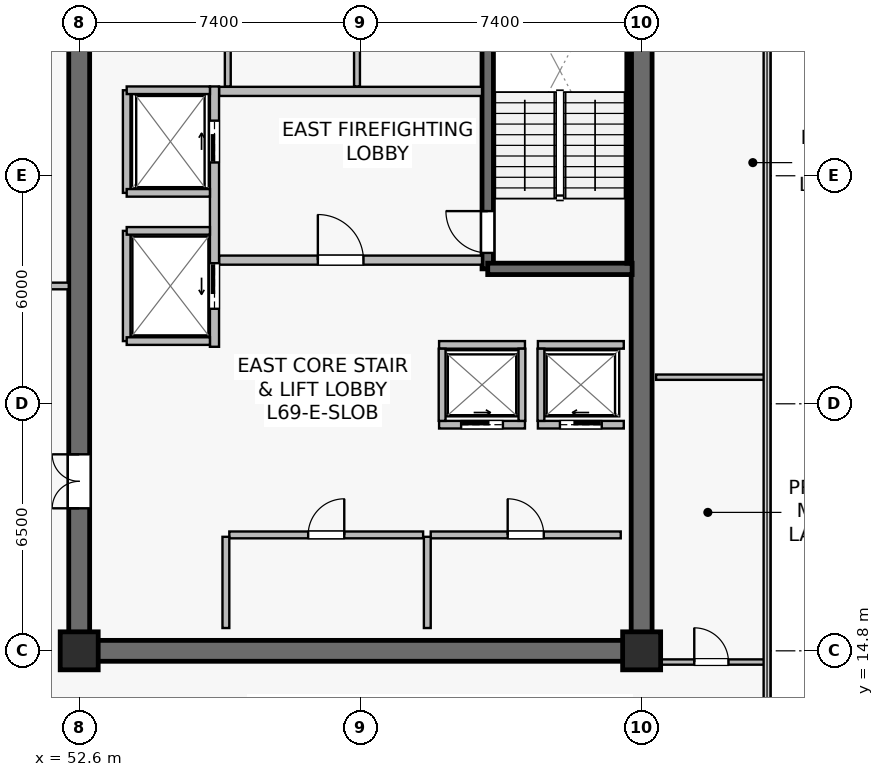
"""IFC4 building model, lengths in metres.
Left out: names, types, materials, properties, quantities, classifications, styles, units other than length and angle.
Written with IfcOpenShell. Run it as: python <this file> out.ifc"""

import sys

from ifc_helpers import new_model, si_unit, direction, frame, frame_2d, origin, origin_2d, place, context, subcontext, project, spatial, rectangle, extrude, source, transform, mapped, element, fill, save


model = new_model("IFC4")
c1 = context("Model", 3, precision=1e-05, world=origin(), true_north=direction((0.0, 1.0)))
c2 = subcontext(c1, "Body", "Model", "MODEL_VIEW")
j1 = project(units=[si_unit("LENGTHUNIT", "METRE"), si_unit("PLANEANGLEUNIT", "RADIAN")], contexts=[c1])
p1 = place(None, origin())
s1 = spatial("IfcSite", under=j1, at=p1, CompositionType="ELEMENT")
p2 = place(p1, origin())
s2 = spatial("IfcBuilding", under=s1, at=p2, CompositionType="ELEMENT")
p3 = place(p2, frame((0.0, 0.0, 287.5)))
s3 = spatial("IfcBuildingStorey", under=s2, at=p3, CompositionType="ELEMENT", Elevation=287.5)
p4 = place(p3, frame((52.325, 14.8, 0.0), z_axis=(0.0, 0.0, 1.0), x_axis=(1.0, 0.0, 0.0)))
e1 = element("IfcWall", 1, at=p4, inside=s3, PredefinedType="SHEAR", context=c2, shape_type="SweptSolid", body=[
    extrude(rectangle(XDim=15.35, YDim=0.55, at=frame_2d((7.675, 0.0))), origin(), (0.0, 0.0, 1.0), 3.8),
])
p5 = place(p3, frame((52.6, 15.075, 0.0), z_axis=(0.0, 0.0, 1.0), x_axis=(0.0, 1.0, 0.0)))
e2 = element("IfcWall", 2, at=p5, inside=s3, PredefinedType="SHEAR", context=c2, shape_type="SweptSolid", body=[
    extrude(rectangle(XDim=18.45, YDim=0.55, at=frame_2d((9.225, 0.0))), origin(), (0.0, 0.0, 1.0), 3.8),
])
p6 = place(p5, frame((3.475, 0.0, 0.0)))
e3 = element("IfcOpeningElement", 3, at=p6, cuts=e2, PredefinedType="OPENING", context=c2, shape_type="SweptSolid", body=[
    extrude(rectangle(XDim=1.42, YDim=2.2, at=frame_2d((0.71, 1.1))), frame((0.0, 0.285, 0.0), z_axis=(0.0, -1.0, 0.0), x_axis=(1.0, 0.0, 0.0)), (0.0, 0.0, 1.0), 0.57),
])
p7 = place(p3, frame((67.4, 15.075, 0.0), z_axis=(0.0, 0.0, 1.0), x_axis=(0.0, 1.0, 0.0)))
e4 = element("IfcWall", 4, at=p7, inside=s3, PredefinedType="SHEAR", context=c2, shape_type="SweptSolid", body=[
    extrude(rectangle(XDim=18.45, YDim=0.55, at=frame_2d((9.225, 0.0))), origin(), (0.0, 0.0, 1.0), 3.8),
])
p8 = place(p3, frame((63.35, 24.85, 0.0), z_axis=(0.0, 0.0, 1.0), x_axis=(0.0, 1.0, 0.0)))
e5 = element("IfcWall", 5, at=p8, inside=s3, PredefinedType="SHEAR", context=c2, shape_type="SweptSolid", body=[
    extrude(rectangle(XDim=8.63, YDim=0.3, at=frame_2d((4.315, 0.0))), origin(), (0.0, 0.0, 1.0), 3.8),
])
p9 = place(p8, frame((0.42, 0.0, 0.0)))
e6 = element("IfcOpeningElement", 6, at=p9, cuts=e5, PredefinedType="OPENING", context=c2, shape_type="SweptSolid", body=[
    extrude(rectangle(XDim=1.1, YDim=2.15, at=frame_2d((0.55, 1.075))), frame((0.0, 0.16, 0.0), z_axis=(0.0, -1.0, 0.0), x_axis=(1.0, 0.0, 0.0)), (0.0, 0.0, 1.0), 0.32),
])
p10 = place(p3, frame((63.35, 24.85, 0.0), z_axis=(0.0, 0.0, 1.0), x_axis=(1.0, 0.0, 0.0)))
e7 = element("IfcWall", 7, at=p10, inside=s3, PredefinedType="SHEAR", context=c2, shape_type="SweptSolid", body=[
    extrude(rectangle(XDim=3.8, YDim=0.3, at=frame_2d((1.9, 0.0))), origin(), (0.0, 0.0, 1.0), 3.8),
])
p11 = place(p3, frame((67.07, 25.0, 0.0), z_axis=(0.0, 0.0, 1.0), x_axis=(0.0, 1.0, 0.0)))
e8 = element("IfcWall", 8, at=p11, inside=s3, PredefinedType="SOLIDWALL", context=c2, shape_type="SweptSolid", body=[
    extrude(rectangle(XDim=8.32, YDim=0.12, at=frame_2d((4.16, 0.0))), origin(), (0.0, 0.0, 1.0), 3.8),
])
m1 = source(origin(), c2, "Body", "SweptSolid", [
    extrude(rectangle(XDim=1.0, YDim=1.0, at=origin_2d()), origin(), (0.0, 0.0, 1.0), 4.1),
])
for number, where, z_axis, x_axis in (
    (9, (52.6, 14.8, 0.0), (0.0, 0.0, 1.0), (1.0, 0.0, 0.0)),
    (10, (67.4, 14.8, 0.0), (0.0, 0.0, 1.0), (1.0, 0.0, 0.0)),
):
    element("IfcColumn", number, at=place(p3, frame(where, z_axis=z_axis, x_axis=x_axis)), inside=s3, PredefinedType="COLUMN", context=c2, shape_type="MappedRepresentation", body=[
        mapped(m1, transform((0.0, 0.0, 0.0), scale=1.0)),
    ])
p12 = place(p3, frame((56.28, 25.08, 0.0), z_axis=(0.0, 0.0, 1.0), x_axis=(1.0, 0.0, 0.0)))
e11 = element("IfcWall", 11, at=p12, inside=s3, PredefinedType="SOLIDWALL", context=c2, shape_type="SweptSolid", body=[
    extrude(rectangle(XDim=6.92, YDim=0.24, at=frame_2d((3.46, 0.0))), origin(), (0.0, 0.0, 1.0), 3.197),
])
p13 = place(p12, frame((2.6, 0.0, 0.0)))
e12 = element("IfcOpeningElement", 12, at=p13, cuts=e11, PredefinedType="OPENING", context=c2, shape_type="SweptSolid", body=[
    extrude(rectangle(XDim=1.2, YDim=2.16, at=frame_2d((0.6, 1.08))), frame((0.0, 0.13, 0.0), z_axis=(0.0, -1.0, 0.0), x_axis=(1.0, 0.0, 0.0)), (0.0, 0.0, 1.0), 0.26),
])
p14 = place(p3, frame((56.28, 29.52, 0.0), z_axis=(0.0, 0.0, 1.0), x_axis=(1.0, 0.0, 0.0)))
e13 = element("IfcWall", 13, at=p14, inside=s3, PredefinedType="SOLIDWALL", context=c2, shape_type="SweptSolid", body=[
    extrude(rectangle(XDim=6.92, YDim=0.24, at=frame_2d((3.46, 0.0))), origin(), (0.0, 0.0, 1.0), 3.197),
])
p15 = place(p3, frame((56.16, 22.8, 0.0), z_axis=(0.0, 0.0, 1.0), x_axis=(0.0, 1.0, 0.0)))
e14 = element("IfcWall", 14, at=p15, inside=s3, PredefinedType="SOLIDWALL", context=c2, shape_type="SweptSolid", body=[
    extrude(rectangle(XDim=6.85, YDim=0.24, at=frame_2d((3.425, 0.0))), origin(), (0.0, 0.0, 1.0), 2.935),
])
p16 = place(p15, frame((4.85, 0.0, 0.0)))
e15 = element("IfcOpeningElement", 15, at=p16, cuts=e14, PredefinedType="OPENING", context=c2, shape_type="SweptSolid", body=[
    extrude(rectangle(XDim=1.1, YDim=2.22, at=frame_2d((0.55, 1.11))), frame((0.0, 0.13, 0.0), z_axis=(0.0, -1.0, 0.0), x_axis=(1.0, 0.0, 0.0)), (0.0, 0.0, 1.0), 0.26),
])
p17 = place(p15, frame((1.0, 0.0, 0.0)))
e16 = element("IfcOpeningElement", 16, at=p17, cuts=e14, PredefinedType="OPENING", context=c2, shape_type="SweptSolid", body=[
    extrude(rectangle(XDim=1.2, YDim=2.22, at=frame_2d((0.6, 1.11))), frame((0.0, 0.13, 0.0), z_axis=(0.0, -1.0, 0.0), x_axis=(1.0, 0.0, 0.0)), (0.0, 0.0, 1.0), 0.26),
])
p18 = place(p3, frame((64.67, 20.75, 0.0), z_axis=(0.0, 0.0, 1.0), x_axis=(1.0, 0.0, 0.0)))
e17 = element("IfcWall", 17, at=p18, inside=s3, PredefinedType="SOLIDWALL", context=c2, shape_type="SweptSolid", body=[
    extrude(rectangle(XDim=2.26, YDim=0.2, at=frame_2d((1.13, 0.0))), origin(), (0.0, 0.0, 1.0), 3.8),
])
p19 = place(p18, frame((0.58, 0.0, 0.0)))
e18 = element("IfcOpeningElement", 18, at=p19, cuts=e17, PredefinedType="OPENING", context=c2, shape_type="SweptSolid", body=[
    extrude(rectangle(XDim=1.1, YDim=2.22, at=frame_2d((0.55, 1.11))), frame((0.0, 0.11, 0.0), z_axis=(0.0, -1.0, 0.0), x_axis=(1.0, 0.0, 0.0)), (0.0, 0.0, 1.0), 0.22),
])
p20 = place(p3, frame((64.67, 22.85, 0.0), z_axis=(0.0, 0.0, 1.0), x_axis=(1.0, 0.0, 0.0)))
e19 = element("IfcWall", 19, at=p20, inside=s3, PredefinedType="SOLIDWALL", context=c2, shape_type="SweptSolid", body=[
    extrude(rectangle(XDim=2.26, YDim=0.2, at=frame_2d((1.13, 0.0))), origin(), (0.0, 0.0, 1.0), 3.8),
])
p21 = place(p3, frame((64.75, 20.85, 0.0), z_axis=(0.0, 0.0, 1.0), x_axis=(0.0, 1.0, 0.0)))
e20 = element("IfcWall", 20, at=p21, inside=s3, PredefinedType="SOLIDWALL", context=c2, shape_type="SweptSolid", body=[
    extrude(rectangle(XDim=1.9, YDim=0.18, at=frame_2d((0.95, 0.0))), origin(), (0.0, 0.0, 1.0), 3.8),
])
p22 = place(p3, frame((62.07, 20.75, 0.0), z_axis=(0.0, 0.0, 1.0), x_axis=(1.0, 0.0, 0.0)))
e21 = element("IfcWall", 21, at=p22, inside=s3, PredefinedType="SOLIDWALL", context=c2, shape_type="SweptSolid", body=[
    extrude(rectangle(XDim=2.26, YDim=0.2, at=frame_2d((1.13, 0.0))), origin(), (0.0, 0.0, 1.0), 3.8),
])
p23 = place(p22, frame((0.58, 0.0, 0.0)))
e22 = element("IfcOpeningElement", 22, at=p23, cuts=e21, PredefinedType="OPENING", context=c2, shape_type="SweptSolid", body=[
    extrude(rectangle(XDim=1.1, YDim=2.22, at=frame_2d((0.55, 1.11))), frame((0.0, 0.11, 0.0), z_axis=(0.0, -1.0, 0.0), x_axis=(1.0, 0.0, 0.0)), (0.0, 0.0, 1.0), 0.22),
])
p24 = place(p3, frame((62.07, 22.85, 0.0), z_axis=(0.0, 0.0, 1.0), x_axis=(1.0, 0.0, 0.0)))
e23 = element("IfcWall", 23, at=p24, inside=s3, PredefinedType="SOLIDWALL", context=c2, shape_type="SweptSolid", body=[
    extrude(rectangle(XDim=2.26, YDim=0.2, at=frame_2d((1.13, 0.0))), origin(), (0.0, 0.0, 1.0), 3.8),
])
for number, where, z_axis, x_axis in (
    (24, (62.15, 20.85, 0.0), (0.0, 0.0, 1.0), (0.0, 1.0, 0.0)),
    (25, (64.25, 20.85, 0.0), (0.0, 0.0, 1.0), (0.0, 1.0, 0.0)),
):
    element("IfcWall", number, at=place(p3, frame(where, z_axis=z_axis, x_axis=x_axis)), inside=s3, PredefinedType="SOLIDWALL", context=c2, shape_type="SweptSolid", body=[
        extrude(rectangle(XDim=1.9, YDim=0.18, at=frame_2d((0.95, 0.0))), origin(), (0.0, 0.0, 1.0), 3.8),
    ])
p25 = place(p3, frame((53.85, 26.85, 0.0), z_axis=(0.0, 0.0, 1.0), x_axis=(0.0, 1.0, 0.0)))
e26 = element("IfcWall", 26, at=p25, inside=s3, PredefinedType="SOLIDWALL", context=c2, shape_type="SweptSolid", body=[
    extrude(rectangle(XDim=2.7, YDim=0.2, at=frame_2d((1.35, 0.0))), origin(), (0.0, 0.0, 1.0), 3.8),
])
p26 = place(p3, frame((53.85, 29.55, 0.0), z_axis=(0.0, 0.0, 1.0), x_axis=(1.0, 0.0, 0.0)))
e27 = element("IfcWall", 27, at=p26, inside=s3, PredefinedType="SOLIDWALL", context=c2, shape_type="SweptSolid", body=[
    extrude(rectangle(XDim=2.19, YDim=0.2, at=frame_2d((1.095, 0.0))), origin(), (0.0, 0.0, 1.0), 3.8),
])
p27 = place(p3, frame((53.85, 26.85, 0.0), z_axis=(0.0, 0.0, 1.0), x_axis=(1.0, 0.0, 0.0)))
e28 = element("IfcWall", 28, at=p27, inside=s3, PredefinedType="SOLIDWALL", context=c2, shape_type="SweptSolid", body=[
    extrude(rectangle(XDim=2.19, YDim=0.2, at=frame_2d((1.095, 0.0))), origin(), (0.0, 0.0, 1.0), 3.197),
])
p28 = place(p3, frame((53.85, 22.95, 0.0), z_axis=(0.0, 0.0, 1.0), x_axis=(0.0, 1.0, 0.0)))
e29 = element("IfcWall", 29, at=p28, inside=s3, PredefinedType="SOLIDWALL", context=c2, shape_type="SweptSolid", body=[
    extrude(rectangle(XDim=2.9, YDim=0.2, at=frame_2d((1.45, 0.0))), origin(), (0.0, 0.0, 1.0), 2.935),
])
for number, where, z_axis, x_axis in (
    (30, (53.85, 25.85, 0.0), (0.0, 0.0, 1.0), (1.0, 0.0, 0.0)),
    (31, (53.85, 22.95, 0.0), (0.0, 0.0, 1.0), (1.0, 0.0, 0.0)),
):
    element("IfcWall", number, at=place(p3, frame(where, z_axis=z_axis, x_axis=x_axis)), inside=s3, PredefinedType="SOLIDWALL", context=c2, shape_type="SweptSolid", body=[
        extrude(rectangle(XDim=2.19, YDim=0.2, at=frame_2d((1.095, 0.0))), origin(), (0.0, 0.0, 1.0), 3.8),
    ])
p29 = place(p3, frame((61.85, 17.85, 0.0), z_axis=(0.0, 0.0, 1.0), x_axis=(1.0, 0.0, 0.0)))
e32 = element("IfcWall", 32, at=p29, inside=s3, PredefinedType="SOLIDWALL", context=c2, shape_type="SweptSolid", body=[
    extrude(rectangle(XDim=5.0, YDim=0.18, at=frame_2d((2.5, 0.0))), origin(), (0.0, 0.0, 1.0), 3.8),
])
p30 = place(p29, frame((2.025, 0.0, 0.0)))
e33 = element("IfcOpeningElement", 33, at=p30, cuts=e32, PredefinedType="OPENING", context=c2, shape_type="SweptSolid", body=[
    extrude(rectangle(XDim=0.95, YDim=2.15, at=frame_2d((0.475, 1.075))), frame((0.0, 0.1, 0.0), z_axis=(0.0, -1.0, 0.0), x_axis=(1.0, 0.0, 0.0)), (0.0, 0.0, 1.0), 0.2),
])
p31 = place(p3, frame((61.76, 15.4, 0.0), z_axis=(0.0, 0.0, 1.0), x_axis=(0.0, 1.0, 0.0)))
e34 = element("IfcWall", 34, at=p31, inside=s3, PredefinedType="SOLIDWALL", context=c2, shape_type="SweptSolid", body=[
    extrude(rectangle(XDim=2.4, YDim=0.18, at=frame_2d((1.2, 0.0))), origin(), (0.0, 0.0, 1.0), 3.8),
])
p32 = place(p3, frame((56.55, 17.85, 0.0), z_axis=(0.0, 0.0, 1.0), x_axis=(1.0, 0.0, 0.0)))
e35 = element("IfcWall", 35, at=p32, inside=s3, PredefinedType="SOLIDWALL", context=c2, shape_type="SweptSolid", body=[
    extrude(rectangle(XDim=5.1, YDim=0.18, at=frame_2d((2.55, 0.0))), origin(), (0.0, 0.0, 1.0), 3.197),
])
p33 = place(p32, frame((2.075, 0.0, 0.0)))
e36 = element("IfcOpeningElement", 36, at=p33, cuts=e35, PredefinedType="OPENING", context=c2, shape_type="SweptSolid", body=[
    extrude(rectangle(XDim=0.95, YDim=2.15, at=frame_2d((0.475, 1.075))), frame((0.0, 0.1, 0.0), z_axis=(0.0, -1.0, 0.0), x_axis=(1.0, 0.0, 0.0)), (0.0, 0.0, 1.0), 0.2),
])
p34 = place(p3, frame((56.46, 15.4, 0.0), z_axis=(0.0, 0.0, 1.0), x_axis=(0.0, 1.0, 0.0)))
e37 = element("IfcWall", 37, at=p34, inside=s3, PredefinedType="SOLIDWALL", context=c2, shape_type="SweptSolid", body=[
    extrude(rectangle(XDim=2.4, YDim=0.18, at=frame_2d((1.2, 0.0))), origin(), (0.0, 0.0, 1.0), 3.8),
])
p35 = place(p3, frame((59.91, 29.65, 0.0), z_axis=(0.0, 0.0, 1.0), x_axis=(0.0, 1.0, 0.0)))
e38 = element("IfcWall", 38, at=p35, inside=s3, PredefinedType="PLUMBINGWALL", context=c2, shape_type="SweptSolid", body=[
    extrude(rectangle(XDim=3.93, YDim=0.155, at=frame_2d((1.965, 0.0))), origin(), (0.0, 0.0, 1.0), 3.197),
])
p36 = place(p3, frame((56.51, 29.65, 0.0), z_axis=(0.0, 0.0, 1.0), x_axis=(0.0, 1.0, 0.0)))
e39 = element("IfcWall", 39, at=p36, inside=s3, PredefinedType="PLUMBINGWALL", context=c2, shape_type="SweptSolid", body=[
    extrude(rectangle(XDim=3.93, YDim=0.155, at=frame_2d((1.965, 0.0))), origin(), (0.0, 0.0, 1.0), 3.8),
])
p37 = place(p3, frame((48.3, 24.4, 0.0), z_axis=(0.0, 0.0, 1.0), x_axis=(1.0, 0.0, 0.0)))
e40 = element("IfcWall", 40, at=p37, inside=s3, PredefinedType="PARTITIONING", context=c2, shape_type="SweptSolid", body=[
    extrude(rectangle(XDim=4.025, YDim=0.175, at=frame_2d((2.012, 0.0))), origin(), (0.0, 0.0, 1.0), 3.8),
])
p38 = place(p37, frame((1.35, 0.0, 0.0)))
e41 = element("IfcOpeningElement", 41, at=p38, cuts=e40, PredefinedType="OPENING", context=c2, shape_type="SweptSolid", body=[
    extrude(rectangle(XDim=0.95, YDim=2.15, at=frame_2d((0.475, 1.075))), frame((0.0, 0.098, 0.0), z_axis=(0.0, -1.0, 0.0), x_axis=(1.0, 0.0, 0.0)), (0.0, 0.0, 1.0), 0.195),
])
p39 = place(p3, frame((67.78, 22.0, 0.0), z_axis=(0.0, 0.0, 1.0), x_axis=(1.0, 0.0, 0.0)))
e42 = element("IfcWall", 42, at=p39, inside=s3, PredefinedType="PARTITIONING", context=c2, shape_type="SweptSolid", body=[
    extrude(rectangle(XDim=2.91, YDim=0.14, at=frame_2d((1.455, 0.0))), origin(), (0.0, 0.0, 1.0), 3.8),
])
p40 = place(p3, frame((67.78, 14.505, 0.0), z_axis=(0.0, 0.0, 1.0), x_axis=(1.0, 0.0, 0.0)))
e43 = element("IfcWall", 43, at=p40, inside=s3, PredefinedType="PARTITIONING", context=c2, shape_type="SweptSolid", body=[
    extrude(rectangle(XDim=2.91, YDim=0.14, at=frame_2d((1.455, 0.0))), origin(), (0.0, 0.0, 1.0), 3.8),
])
p41 = place(p40, frame((1.005, 0.0, 0.0)))
e44 = element("IfcOpeningElement", 44, at=p41, cuts=e43, PredefinedType="OPENING", context=c2, shape_type="SweptSolid", body=[
    extrude(rectangle(XDim=0.9, YDim=2.1, at=frame_2d((0.45, 1.05))), frame((0.0, 0.08, 0.0), z_axis=(0.0, -1.0, 0.0), x_axis=(1.0, 0.0, 0.0)), (0.0, 0.0, 1.0), 0.16),
])
m2 = source(origin(), c2, "Body", "SweptSolid", [
    extrude(rectangle(XDim=1.1, YDim=2.15, at=frame_2d((0.55, 1.075))), frame((0.0, 0.025, 0.0), z_axis=(0.0, -1.0, 0.0), x_axis=(1.0, 0.0, 0.0)), (0.0, 0.0, 1.0), 0.05),
])
p42 = place(p9, origin())
e45 = element("IfcDoor", 45, at=p42, inside=s3, OperationType="SINGLE_SWING_RIGHT", PredefinedType="DOOR", context=c2, shape_type="MappedRepresentation", body=[
    mapped(m2, transform((0.0, 0.0, 0.0), scale=1.0)),
])
fill(e6, e45)
m3 = source(origin(), c2, "Body", "SweptSolid", [
    extrude(rectangle(XDim=1.2, YDim=2.16, at=frame_2d((0.6, 1.08))), frame((0.0, 0.025, 0.0), z_axis=(0.0, -1.0, 0.0), x_axis=(1.0, 0.0, 0.0)), (0.0, 0.0, 1.0), 0.05),
])
p43 = place(p13, origin())
e46 = element("IfcDoor", 46, at=p43, inside=s3, OperationType="SINGLE_SWING_LEFT", PredefinedType="DOOR", context=c2, shape_type="MappedRepresentation", body=[
    mapped(m3, transform((0.0, 0.0, 0.0), scale=1.0)),
])
fill(e12, e46)
m4 = source(origin(), c2, "Body", "SweptSolid", [
    extrude(rectangle(XDim=1.1, YDim=2.22, at=frame_2d((0.55, 1.11))), frame((0.0, 0.025, 0.0), z_axis=(0.0, -1.0, 0.0), x_axis=(1.0, 0.0, 0.0)), (0.0, 0.0, 1.0), 0.05),
])
p44 = place(p19, origin())
e47 = element("IfcDoor", 47, at=p44, inside=s3, OperationType="SLIDING_TO_LEFT", PredefinedType="USERDEFINED", context=c2, shape_type="MappedRepresentation", body=[
    mapped(m4, transform((0.0, 0.0, 0.0), scale=1.0)),
])
fill(e18, e47)
p45 = place(p23, origin())
e48 = element("IfcDoor", 48, at=p45, inside=s3, OperationType="SLIDING_TO_RIGHT", PredefinedType="USERDEFINED", context=c2, shape_type="MappedRepresentation", body=[
    mapped(m4, transform((0.0, 0.0, 0.0), scale=1.0)),
])
fill(e22, e48)
p46 = place(p16, origin())
e49 = element("IfcDoor", 49, at=p46, inside=s3, OperationType="SLIDING_TO_RIGHT", PredefinedType="USERDEFINED", context=c2, shape_type="MappedRepresentation", body=[
    mapped(m4, transform((0.0, 0.0, 0.0), scale=1.0)),
])
fill(e15, e49)
m5 = source(origin(), c2, "Body", "SweptSolid", [
    extrude(rectangle(XDim=1.2, YDim=2.22, at=frame_2d((0.6, 1.11))), frame((0.0, 0.025, 0.0), z_axis=(0.0, -1.0, 0.0), x_axis=(1.0, 0.0, 0.0)), (0.0, 0.0, 1.0), 0.05),
])
p47 = place(p17, origin())
e50 = element("IfcDoor", 50, at=p47, inside=s3, OperationType="SLIDING_TO_LEFT", PredefinedType="USERDEFINED", context=c2, shape_type="MappedRepresentation", body=[
    mapped(m5, transform((0.0, 0.0, 0.0), scale=1.0)),
])
fill(e16, e50)
m6 = source(origin(), c2, "Body", "SweptSolid", [
    extrude(rectangle(XDim=0.95, YDim=2.15, at=frame_2d((0.475, 1.075))), frame((0.0, 0.025, 0.0), z_axis=(0.0, -1.0, 0.0), x_axis=(1.0, 0.0, 0.0)), (0.0, 0.0, 1.0), 0.05),
])
p48 = place(p30, origin())
e51 = element("IfcDoor", 51, at=p48, inside=s3, OperationType="SINGLE_SWING_LEFT", PredefinedType="DOOR", context=c2, shape_type="MappedRepresentation", body=[
    mapped(m6, transform((0.0, 0.0, 0.0), scale=1.0)),
])
fill(e33, e51)
p49 = place(p33, origin())
e52 = element("IfcDoor", 52, at=p49, inside=s3, OperationType="SINGLE_SWING_RIGHT", PredefinedType="DOOR", context=c2, shape_type="MappedRepresentation", body=[
    mapped(m6, transform((0.0, 0.0, 0.0), scale=1.0)),
])
fill(e36, e52)
m7 = source(origin(), c2, "Body", "SweptSolid", [
    extrude(rectangle(XDim=1.42, YDim=2.2, at=frame_2d((0.71, 1.1))), frame((0.0, 0.025, 0.0), z_axis=(0.0, -1.0, 0.0), x_axis=(1.0, 0.0, 0.0)), (0.0, 0.0, 1.0), 0.05),
])
p50 = place(p6, origin())
e53 = element("IfcDoor", 53, at=p50, inside=s3, OperationType="DOUBLE_DOOR_SINGLE_SWING", PredefinedType="DOOR", context=c2, shape_type="MappedRepresentation", body=[
    mapped(m7, transform((0.0, 0.0, 0.0), scale=1.0)),
])
fill(e3, e53)
m8 = source(origin(), c2, "Body", "SweptSolid", [
    extrude(rectangle(XDim=0.9, YDim=2.1, at=frame_2d((0.45, 1.05))), frame((0.0, 0.025, 0.0), z_axis=(0.0, -1.0, 0.0), x_axis=(1.0, 0.0, 0.0)), (0.0, 0.0, 1.0), 0.05),
])
p51 = place(p41, origin())
e54 = element("IfcDoor", 54, at=p51, inside=s3, OperationType="SINGLE_SWING_LEFT", PredefinedType="DOOR", context=c2, shape_type="MappedRepresentation", body=[
    mapped(m8, transform((0.0, 0.0, 0.0), scale=1.0)),
])
fill(e44, e54)
save(model, sys.argv[1])
